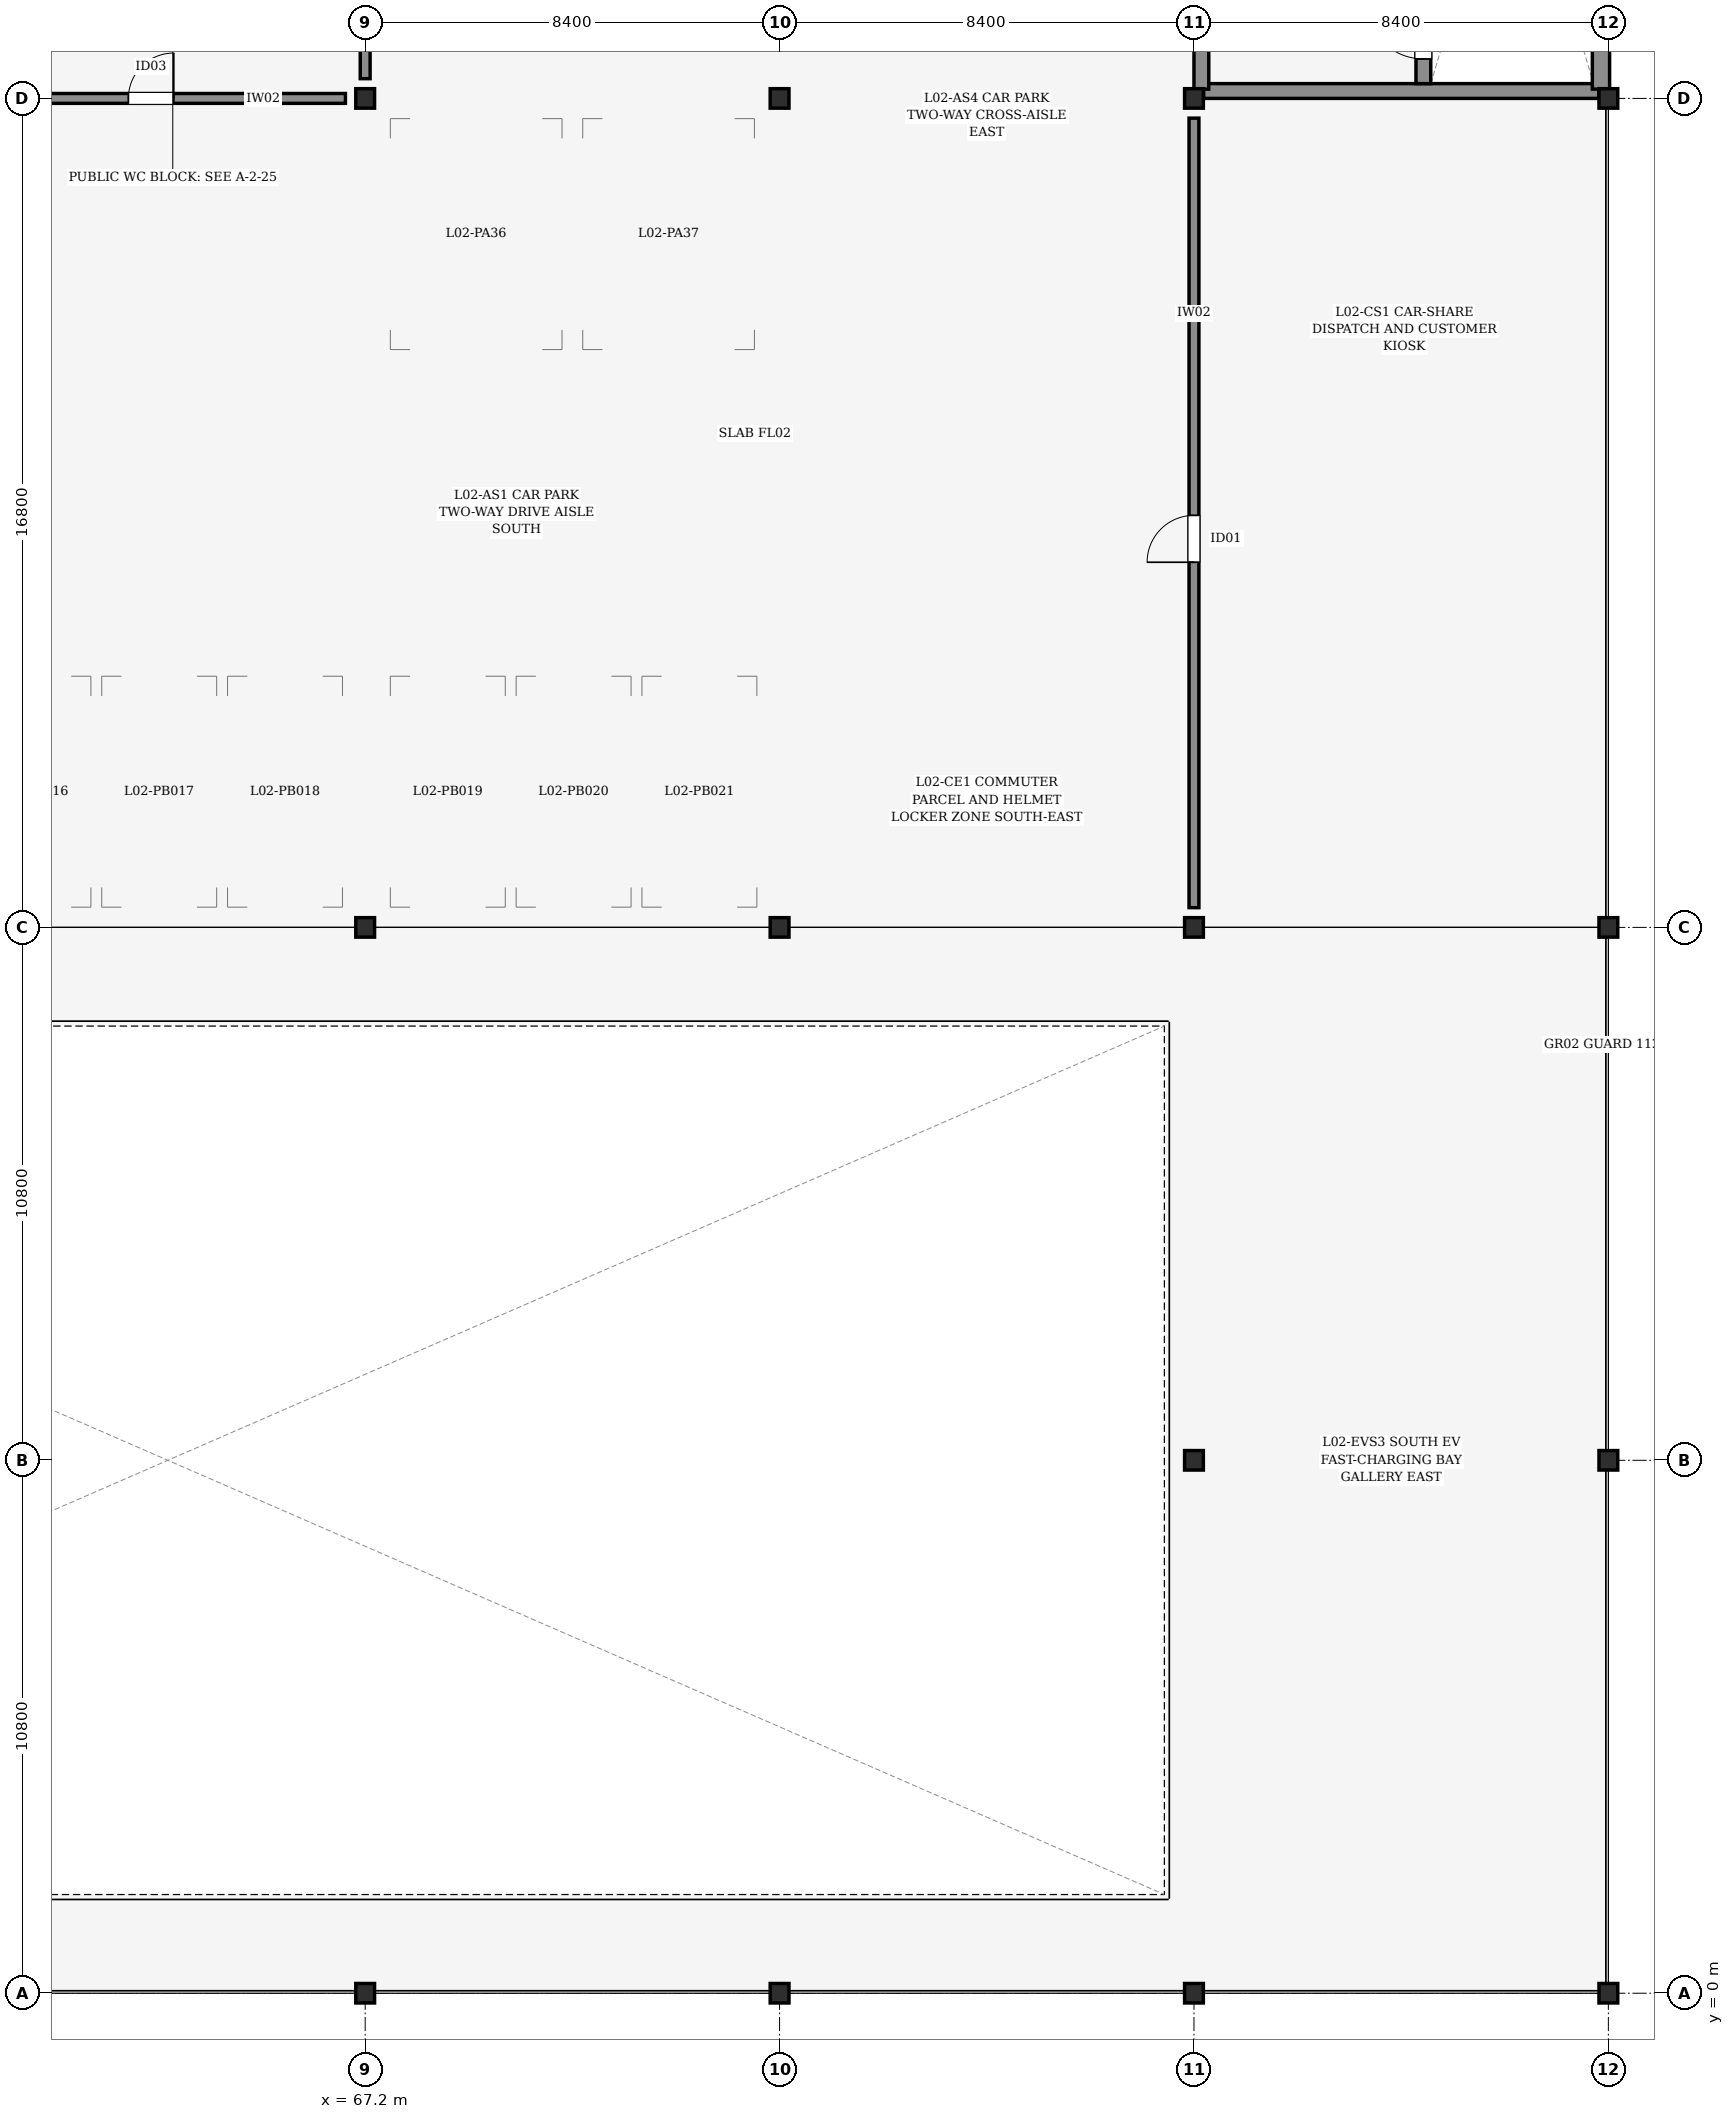
"""IFC4 building model, lengths in metres.
Left out: names, types, materials, properties, quantities, classifications, styles, units other than length and angle.
Written with IfcOpenShell. Run it as: python <this file> out.ifc"""

import sys

from ifc_helpers import new_model, si_unit, direction, frame, frame_2d, origin, origin_2d, place, context, subcontext, project, spatial, rectangle, i_section, extrude, element, fill, save


model = new_model("IFC4")
c1 = context("Model", 3, precision=1e-05, world=origin(), true_north=direction((0.0, 1.0)))
c2 = subcontext(c1, "Body", "Model", "MODEL_VIEW")
j1 = project(units=[si_unit("LENGTHUNIT", "METRE"), si_unit("PLANEANGLEUNIT", "RADIAN")], contexts=[c1])
p1 = place(None, origin())
s1 = spatial("IfcSite", under=j1, at=p1, CompositionType="ELEMENT")
p2 = place(p1, origin())
s2 = spatial("IfcBuilding", under=s1, at=p2, CompositionType="ELEMENT")
p3 = place(p2, frame((0.0, 0.0, 9.0)))
s3 = spatial("IfcBuildingStorey", under=s2, at=p3, CompositionType="ELEMENT", Elevation=9.0)
for number, where, z_axis, x_axis in (
    (1, (67.2, 0.0, 0.0), (0.0, 0.0, 1.0), (1.0, 0.0, 0.0)),
    (2, (67.2, 21.6, 0.0), (0.0, 0.0, 1.0), (1.0, 0.0, 0.0)),
    (3, (67.2, 38.4, 0.0), (0.0, 0.0, 1.0), (1.0, 0.0, 0.0)),
    (4, (75.6, 0.0, 0.0), (0.0, 0.0, 1.0), (1.0, 0.0, 0.0)),
    (5, (75.6, 21.6, 0.0), (0.0, 0.0, 1.0), (1.0, 0.0, 0.0)),
    (6, (75.6, 38.4, 0.0), (0.0, 0.0, 1.0), (1.0, 0.0, 0.0)),
    (7, (84.0, 0.0, 0.0), (0.0, 0.0, 1.0), (1.0, 0.0, 0.0)),
    (8, (84.0, 10.8, 0.0), (0.0, 0.0, 1.0), (1.0, 0.0, 0.0)),
    (9, (84.0, 21.6, 0.0), (0.0, 0.0, 1.0), (1.0, 0.0, 0.0)),
    (10, (84.0, 38.4, 0.0), (0.0, 0.0, 1.0), (1.0, 0.0, 0.0)),
    (11, (92.4, 0.0, 0.0), (0.0, 0.0, 1.0), (1.0, 0.0, 0.0)),
    (12, (92.4, 10.8, 0.0), (0.0, 0.0, 1.0), (1.0, 0.0, 0.0)),
    (13, (92.4, 21.6, 0.0), (0.0, 0.0, 1.0), (1.0, 0.0, 0.0)),
    (14, (92.4, 38.4, 0.0), (0.0, 0.0, 1.0), (1.0, 0.0, 0.0)),
):
    element("IfcColumn", number, at=place(p3, frame(where, z_axis=z_axis, x_axis=x_axis)), inside=s3, PredefinedType="COLUMN", context=c2, shape_type="SweptSolid", body=[
        extrude(i_section(OverallWidth=0.395, OverallDepth=0.381, WebThickness=0.018, FlangeThickness=0.03, FilletRadius=0.015, at=origin_2d()), origin(), (0.0, 0.0, 1.0), 3.6),
    ])
p4 = place(p3, frame((84.196, 38.55, 0.0), z_axis=(0.0, 0.0, 1.0), x_axis=(1.0, 0.0, 0.0)))
e15 = element("IfcWall", 15, at=p4, inside=s3, PredefinedType="SHEAR", context=c2, shape_type="SweptSolid", body=[
    extrude(rectangle(XDim=8.009, YDim=0.3, at=frame_2d((4.004, 0.0))), origin(), (0.0, 0.0, 1.0), 3.38),
])
p5 = place(p3, frame((92.25, 38.588, 0.0), z_axis=(0.0, 0.0, 1.0), x_axis=(0.0, 1.0, 0.0)))
e16 = element("IfcWall", 16, at=p5, inside=s3, PredefinedType="SHEAR", context=c2, shape_type="SweptSolid", body=[
    extrude(rectangle(XDim=16.423, YDim=0.35, at=frame_2d((8.211, 0.0))), origin(), (0.0, 0.0, 1.0), 3.38),
])
p6 = place(p3, frame((84.15, 38.588, 0.0), z_axis=(0.0, 0.0, 1.0), x_axis=(0.0, 1.0, 0.0)))
e17 = element("IfcWall", 17, at=p6, inside=s3, PredefinedType="SHEAR", context=c2, shape_type="SweptSolid", body=[
    extrude(rectangle(XDim=16.423, YDim=0.3, at=frame_2d((8.211, 0.0))), origin(), (0.0, 0.0, 1.0), 3.38),
])
p7 = place(p6, frame((5.662, 0.0, 0.0)))
e18 = element("IfcOpeningElement", 18, at=p7, cuts=e17, PredefinedType="OPENING", context=c2, shape_type="SweptSolid", body=[
    extrude(rectangle(XDim=1.25, YDim=2.15, at=frame_2d((0.625, 1.075))), frame((0.0, 0.16, 0.0), z_axis=(0.0, -1.0, 0.0), x_axis=(1.0, 0.0, 0.0)), (0.0, 0.0, 1.0), 0.32),
])
p8 = place(p3, frame((88.65, 38.7, 0.0), z_axis=(0.0, 0.0, 1.0), x_axis=(0.0, 1.0, 0.0)))
e19 = element("IfcWall", 19, at=p8, inside=s3, PredefinedType="SHEAR", context=c2, shape_type="SweptSolid", body=[
    extrude(rectangle(XDim=16.2, YDim=0.3, at=frame_2d((8.1, 0.0))), origin(), (0.0, 0.0, 1.0), 3.38),
])
p9 = place(p8, frame((0.5, 0.0, 0.0)))
e20 = element("IfcOpeningElement", 20, at=p9, cuts=e19, PredefinedType="OPENING", context=c2, shape_type="SweptSolid", body=[
    extrude(rectangle(XDim=1.15, YDim=2.15, at=frame_2d((0.575, 1.075))), frame((0.0, 0.16, 0.0), z_axis=(0.0, -1.0, 0.0), x_axis=(1.0, 0.0, 0.0)), (0.0, 0.0, 1.0), 0.32),
])
p10 = place(p3, frame((59.2, 38.4, 0.0), z_axis=(0.0, 0.0, 1.0), x_axis=(1.0, 0.0, 0.0)))
e21 = element("IfcWall", 21, at=p10, inside=s3, PredefinedType="PARTITIONING", context=c2, shape_type="SweptSolid", body=[
    extrude(rectangle(XDim=7.6, YDim=0.2, at=frame_2d((3.8, 0.0))), origin(), (0.0, 0.0, 1.0), 2.525),
])
p11 = place(p10, frame((3.2, 0.0, 0.0)))
e22 = element("IfcOpeningElement", 22, at=p11, cuts=e21, PredefinedType="OPENING", context=c2, shape_type="SweptSolid", body=[
    extrude(rectangle(XDim=0.92, YDim=2.1, at=frame_2d((0.46, 1.05))), frame((0.0, 0.11, 0.0), z_axis=(0.0, -1.0, 0.0), x_axis=(1.0, 0.0, 0.0)), (0.0, 0.0, 1.0), 0.22),
])
p12 = place(p3, frame((67.2, 38.8, 0.0), z_axis=(0.0, 0.0, 1.0), x_axis=(0.0, 1.0, 0.0)))
e23 = element("IfcWall", 23, at=p12, inside=s3, PredefinedType="PARTITIONING", context=c2, shape_type="SweptSolid", body=[
    extrude(rectangle(XDim=7.6, YDim=0.2, at=frame_2d((3.8, 0.0))), origin(), (0.0, 0.0, 1.0), 2.525),
])
p13 = place(p3, frame((84.0, 22.0, 0.0), z_axis=(0.0, 0.0, 1.0), x_axis=(0.0, 1.0, 0.0)))
e24 = element("IfcWall", 24, at=p13, inside=s3, PredefinedType="PARTITIONING", context=c2, shape_type="SweptSolid", body=[
    extrude(rectangle(XDim=16.0, YDim=0.2, at=frame_2d((8.0, 0.0))), origin(), (0.0, 0.0, 1.0), 2.525),
])
p14 = place(p13, frame((7.0, 0.0, 0.0)))
e25 = element("IfcOpeningElement", 25, at=p14, cuts=e24, PredefinedType="OPENING", context=c2, shape_type="SweptSolid", body=[
    extrude(rectangle(XDim=0.95, YDim=2.1, at=frame_2d((0.475, 1.05))), frame((0.0, 0.11, 0.0), z_axis=(0.0, -1.0, 0.0), x_axis=(1.0, 0.0, 0.0)), (0.0, 0.0, 1.0), 0.22),
])
p15 = place(p9, origin())
e26 = element("IfcDoor", 26, at=p15, inside=s3, OperationType="SINGLE_SWING_RIGHT", PredefinedType="DOOR", context=c2, shape_type="SweptSolid", body=[
    extrude(rectangle(XDim=1.15, YDim=2.15, at=frame_2d((0.575, 1.075))), frame((0.0, 0.025, 0.0), z_axis=(0.0, -1.0, 0.0), x_axis=(1.0, 0.0, 0.0)), (0.0, 0.0, 1.0), 0.05),
])
fill(e20, e26)
p16 = place(p11, origin())
e27 = element("IfcDoor", 27, at=p16, inside=s3, OperationType="SINGLE_SWING_RIGHT", PredefinedType="DOOR", context=c2, shape_type="SweptSolid", body=[
    extrude(rectangle(XDim=0.92, YDim=2.1, at=frame_2d((0.46, 1.05))), frame((0.0, 0.025, 0.0), z_axis=(0.0, -1.0, 0.0), x_axis=(1.0, 0.0, 0.0)), (0.0, 0.0, 1.0), 0.05),
])
fill(e22, e27)
p17 = place(p14, origin())
e28 = element("IfcDoor", 28, at=p17, inside=s3, OperationType="SINGLE_SWING_LEFT", PredefinedType="DOOR", context=c2, shape_type="SweptSolid", body=[
    extrude(rectangle(XDim=0.95, YDim=2.1, at=frame_2d((0.475, 1.05))), frame((0.0, 0.025, 0.0), z_axis=(0.0, -1.0, 0.0), x_axis=(1.0, 0.0, 0.0)), (0.0, 0.0, 1.0), 0.05),
])
fill(e25, e28)
save(model, sys.argv[1])
